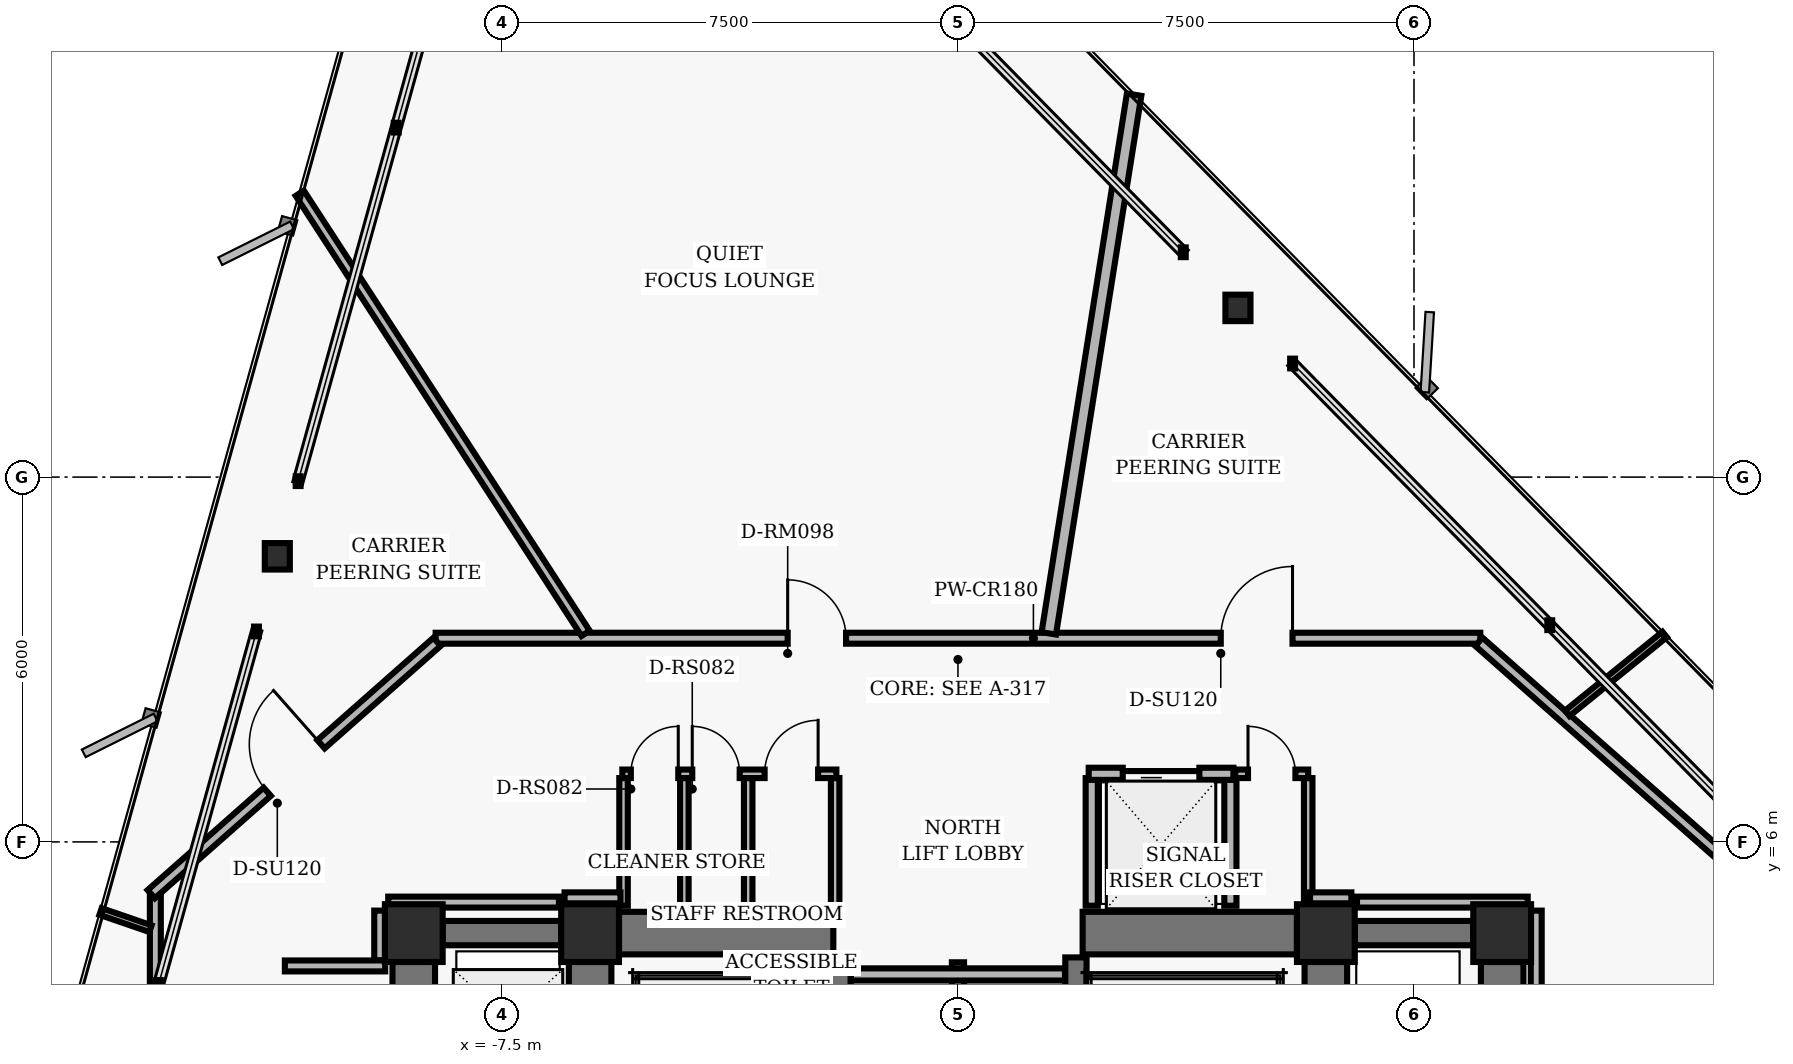
"""IFC4 building model, lengths in metres.
Left out: names, types, materials, properties, quantities, classifications, styles, units other than length and angle.
Written with IfcOpenShell. Run it as: python <this file> out.ifc"""

import sys

from ifc_helpers import new_model, si_unit, direction, frame, frame_2d, origin, origin_2d, place, context, subcontext, project, spatial, rectangle, hollow_rectangle, i_section, extrude, element, fill, save


model = new_model("IFC4")
c1 = context("Model", 3, precision=1e-05, world=origin(), true_north=direction((0.0, 1.0)))
c2 = subcontext(c1, "Body", "Model", "MODEL_VIEW")
j1 = project(units=[si_unit("LENGTHUNIT", "METRE"), si_unit("PLANEANGLEUNIT", "RADIAN")], contexts=[c1])
p1 = place(None, origin())
s1 = spatial("IfcSite", under=j1, at=p1, CompositionType="ELEMENT")
p2 = place(p1, origin())
s2 = spatial("IfcBuilding", under=s1, at=p2, CompositionType="ELEMENT")
p3 = place(p2, frame((0.0, 0.0, 91.68)))
s3 = spatial("IfcBuildingStorey", under=s2, at=p3, CompositionType="ELEMENT", Elevation=91.68)
for number, where, z_axis, x_axis in (
    (1, (-6.05, 4.5, 0.0), (0.0, 0.0, 1.0), (1.0, 0.0, 0.0)),
    (2, (6.05, 4.5, 0.0), (0.0, 0.0, 1.0), (1.0, 0.0, 0.0)),
    (3, (-8.95, 4.5, 0.0), (0.0, 0.0, 1.0), (1.0, 0.0, 0.0)),
    (4, (8.95, 4.5, 0.0), (0.0, 0.0, 1.0), (1.0, 0.0, 0.0)),
):
    element("IfcColumn", number, at=place(p3, frame(where, z_axis=z_axis, x_axis=x_axis)), inside=s3, PredefinedType="COLUMN", context=c2, shape_type="SweptSolid", body=[
        extrude(hollow_rectangle(XDim=0.95, YDim=0.95, WallThickness=0.06, InnerFilletRadius=0.02, OuterFilletRadius=0.04, at=origin_2d()), origin(), (0.0, 0.0, 1.0), 3.04),
    ])
for number, where, z_axis, x_axis in (
    (5, (-6.05, 0.475, 0.0), (0.0, 0.0, 1.0), (0.0, 1.0, 0.0)),
    (6, (6.05, 0.475, 0.0), (0.0, 0.0, 1.0), (0.0, 1.0, 0.0)),
):
    element("IfcWall", number, at=place(p3, frame(where, z_axis=z_axis, x_axis=x_axis)), inside=s3, PredefinedType="SHEAR", context=c2, shape_type="SweptSolid", body=[
        extrude(rectangle(XDim=3.55, YDim=0.7, at=frame_2d((1.775, 0.0))), origin(), (0.0, 0.0, 1.0), 2.788),
    ])
for number, where, z_axis, x_axis in (
    (7, (-1.94, -4.1, 0.0), (0.0, 0.0, 1.0), (0.0, 1.0, 0.0)),
    (8, (1.94, -4.1, 0.0), (0.0, 0.0, 1.0), (0.0, 1.0, 0.0)),
):
    element("IfcWall", number, at=place(p3, frame(where, z_axis=z_axis, x_axis=x_axis)), inside=s3, PredefinedType="SHEAR", context=c2, shape_type="SweptSolid", body=[
        extrude(rectangle(XDim=8.2, YDim=0.35, at=frame_2d((4.1, 0.0))), origin(), (0.0, 0.0, 1.0), 2.788),
    ])
for number, where, z_axis, x_axis in (
    (9, (-5.575, 4.5, 0.0), (0.0, 0.0, 1.0), (1.0, 0.0, 0.0)),
    (10, (2.05, 4.5, 0.0), (0.0, 0.0, 1.0), (1.0, 0.0, 0.0)),
):
    element("IfcWall", number, at=place(p3, frame(where, z_axis=z_axis, x_axis=x_axis)), inside=s3, PredefinedType="SHEAR", context=c2, shape_type="SweptSolid", body=[
        extrude(rectangle(XDim=3.525, YDim=0.7, at=frame_2d((1.762, 0.0))), origin(), (0.0, 0.0, 1.0), 2.788),
    ])
p4 = place(p3, frame((-8.95, -3.825, 0.0), z_axis=(0.0, 0.0, 1.0), x_axis=(0.0, 1.0, 0.0)))
e11 = element("IfcWall", 11, at=p4, inside=s3, PredefinedType="SHEAR", context=c2, shape_type="SweptSolid", body=[
    extrude(rectangle(XDim=7.85, YDim=0.7, at=frame_2d((3.925, 0.0))), origin(), (0.0, 0.0, 1.0), 2.788),
])
p5 = place(p4, frame((0.55, 0.0, 0.0)))
e12 = element("IfcOpeningElement", 12, at=p5, cuts=e11, PredefinedType="OPENING", context=c2, shape_type="SweptSolid", body=[
    extrude(rectangle(XDim=1.06, YDim=2.04, at=frame_2d((0.53, 1.02))), frame((0.0, 0.36, 0.0), z_axis=(0.0, -1.0, 0.0), x_axis=(1.0, 0.0, 0.0)), (0.0, 0.0, 1.0), 0.72),
])
p6 = place(p4, frame((3.395, 0.0, 0.0)))
e13 = element("IfcOpeningElement", 13, at=p6, cuts=e11, PredefinedType="OPENING", context=c2, shape_type="SweptSolid", body=[
    extrude(rectangle(XDim=1.06, YDim=2.04, at=frame_2d((0.53, 1.02))), frame((0.0, 0.36, 0.0), z_axis=(0.0, -1.0, 0.0), x_axis=(1.0, 0.0, 0.0)), (0.0, 0.0, 1.0), 0.72),
])
p7 = place(p4, frame((6.23, 0.0, 0.0)))
e14 = element("IfcOpeningElement", 14, at=p7, cuts=e11, PredefinedType="OPENING", context=c2, shape_type="SweptSolid", body=[
    extrude(rectangle(XDim=1.06, YDim=2.04, at=frame_2d((0.53, 1.02))), frame((0.0, 0.36, 0.0), z_axis=(0.0, -1.0, 0.0), x_axis=(1.0, 0.0, 0.0)), (0.0, 0.0, 1.0), 0.72),
])
p8 = place(p3, frame((-8.475, 4.5, 0.0), z_axis=(0.0, 0.0, 1.0), x_axis=(1.0, 0.0, 0.0)))
e15 = element("IfcWall", 15, at=p8, inside=s3, PredefinedType="SHEAR", context=c2, shape_type="SweptSolid", body=[
    extrude(rectangle(XDim=1.95, YDim=0.4, at=frame_2d((0.975, 0.0))), origin(), (0.0, 0.0, 1.0), 2.788),
])
p9 = place(p3, frame((8.95, -3.825, 0.0), z_axis=(0.0, 0.0, 1.0), x_axis=(0.0, 1.0, 0.0)))
e16 = element("IfcWall", 16, at=p9, inside=s3, PredefinedType="SHEAR", context=c2, shape_type="SweptSolid", body=[
    extrude(rectangle(XDim=7.85, YDim=0.7, at=frame_2d((3.925, 0.0))), origin(), (0.0, 0.0, 1.0), 2.788),
])
p10 = place(p3, frame((6.525, 4.5, 0.0), z_axis=(0.0, 0.0, 1.0), x_axis=(1.0, 0.0, 0.0)))
e17 = element("IfcWall", 17, at=p10, inside=s3, PredefinedType="SHEAR", context=c2, shape_type="SweptSolid", body=[
    extrude(rectangle(XDim=1.95, YDim=0.4, at=frame_2d((0.975, 0.0))), origin(), (0.0, 0.0, 1.0), 2.788),
])
for number, where, z_axis, x_axis in (
    (18, (4.604, 14.783, 0.0), (0.0, 0.0, 1.0), (1.0, 0.0, 0.0)),
    (19, (-11.194, 10.697, 0.0), (0.0, 0.0, 1.0), (1.0, 0.0, 0.0)),
):
    element("IfcColumn", number, at=place(p3, frame(where, z_axis=z_axis, x_axis=x_axis)), inside=s3, PredefinedType="COLUMN", context=c2, shape_type="SweptSolid", body=[
        extrude(i_section(OverallWidth=0.412, OverallDepth=0.435, WebThickness=0.036, FlangeThickness=0.057, FilletRadius=0.022, at=origin_2d()), origin(), (0.0, 0.0, 1.0), 3.04),
    ])
p11 = place(p3, frame((0.0, 1.25, 0.0), z_axis=(0.0, 0.0, 1.0), x_axis=(0.0, 1.0, 0.0)))
e20 = element("IfcWall", 20, at=p11, inside=s3, PredefinedType="PARTITIONING", context=c2, shape_type="SweptSolid", body=[
    extrude(rectangle(XDim=2.77, YDim=0.2, at=frame_2d((1.385, 0.0))), origin(), (0.0, 0.0, 1.0), 2.763),
])
p12 = place(p3, frame((-1.76, 3.82, 0.0), z_axis=(0.0, 0.0, 1.0), x_axis=(1.0, 0.0, 0.0)))
e21 = element("IfcWall", 21, at=p12, inside=s3, PredefinedType="PARTITIONING", context=c2, shape_type="SweptSolid", body=[
    extrude(rectangle(XDim=3.52, YDim=0.2, at=frame_2d((1.76, 0.0))), origin(), (0.0, 0.0, 1.0), 2.763),
])
for number, where, z_axis, x_axis in (
    (22, (2.2, 4.95, 0.0), (0.0, 0.0, 1.0), (0.0, 1.0, 0.0)),
    (23, (4.48, 4.95, 0.0), (0.0, 0.0, 1.0), (0.0, 1.0, 0.0)),
):
    element("IfcWall", number, at=place(p3, frame(where, z_axis=z_axis, x_axis=x_axis)), inside=s3, PredefinedType="PARTITIONING", context=c2, shape_type="SweptSolid", body=[
        extrude(rectangle(XDim=2.1, YDim=0.2, at=frame_2d((1.05, 0.0))), origin(), (0.0, 0.0, 1.0), 2.763),
    ])
p13 = place(p3, frame((2.15, 7.12, 0.0), z_axis=(0.0, 0.0, 1.0), x_axis=(1.0, 0.0, 0.0)))
e24 = element("IfcWall", 24, at=p13, inside=s3, PredefinedType="PARTITIONING", context=c2, shape_type="SweptSolid", body=[
    extrude(rectangle(XDim=2.38, YDim=0.2, at=frame_2d((1.19, 0.0))), origin(), (0.0, 0.0, 1.0), 2.763),
])
p14 = place(p13, frame((0.56, 0.0, 0.0)))
e25 = element("IfcOpeningElement", 25, at=p14, cuts=e24, PredefinedType="OPENING", context=c2, shape_type="SweptSolid", body=[
    extrude(rectangle(XDim=1.26, YDim=2.06, at=frame_2d((0.63, 1.03))), frame((0.0, 0.11, 0.0), z_axis=(0.0, -1.0, 0.0), x_axis=(1.0, 0.0, 0.0)), (0.0, 0.0, 1.0), 0.22),
])
for number, where, z_axis, x_axis in (
    (26, (-5.5, 4.95, 0.0), (0.0, 0.0, 1.0), (0.0, 1.0, 0.0)),
    (27, (-4.5, 4.95, 0.0), (0.0, 0.0, 1.0), (0.0, 1.0, 0.0)),
    (28, (-3.45, 4.95, 0.0), (0.0, 0.0, 1.0), (0.0, 1.0, 0.0)),
    (29, (-2.02, 4.95, 0.0), (0.0, 0.0, 1.0), (0.0, 1.0, 0.0)),
):
    element("IfcWall", number, at=place(p3, frame(where, z_axis=z_axis, x_axis=x_axis)), inside=s3, PredefinedType="PARTITIONING", context=c2, shape_type="SweptSolid", body=[
        extrude(rectangle(XDim=2.1, YDim=0.14, at=frame_2d((1.05, 0.0))), origin(), (0.0, 0.0, 1.0), 2.763),
    ])
p15 = place(p3, frame((-5.52, 7.12, 0.0), z_axis=(0.0, 0.0, 1.0), x_axis=(1.0, 0.0, 0.0)))
e30 = element("IfcWall", 30, at=p15, inside=s3, PredefinedType="PARTITIONING", context=c2, shape_type="SweptSolid", body=[
    extrude(rectangle(XDim=3.52, YDim=0.14, at=frame_2d((1.76, 0.0))), origin(), (0.0, 0.0, 1.0), 2.763),
])
p16 = place(p15, frame((0.14, 0.0, 0.0)))
e31 = element("IfcOpeningElement", 31, at=p16, cuts=e30, PredefinedType="OPENING", context=c2, shape_type="SweptSolid", body=[
    extrude(rectangle(XDim=0.78, YDim=2.01, at=frame_2d((0.39, 1.005))), frame((0.0, 0.08, 0.0), z_axis=(0.0, -1.0, 0.0), x_axis=(1.0, 0.0, 0.0)), (0.0, 0.0, 1.0), 0.16),
])
p17 = place(p15, frame((1.15, 0.0, 0.0)))
e32 = element("IfcOpeningElement", 32, at=p17, cuts=e30, PredefinedType="OPENING", context=c2, shape_type="SweptSolid", body=[
    extrude(rectangle(XDim=0.78, YDim=2.01, at=frame_2d((0.39, 1.005))), frame((0.0, 0.08, 0.0), z_axis=(0.0, -1.0, 0.0), x_axis=(1.0, 0.0, 0.0)), (0.0, 0.0, 1.0), 0.16),
])
p18 = place(p15, frame((2.34, 0.0, 0.0)))
e33 = element("IfcOpeningElement", 33, at=p18, cuts=e30, PredefinedType="OPENING", context=c2, shape_type="SweptSolid", body=[
    extrude(rectangle(XDim=0.88, YDim=2.02, at=frame_2d((0.44, 1.01))), frame((0.0, 0.08, 0.0), z_axis=(0.0, -1.0, 0.0), x_axis=(1.0, 0.0, 0.0)), (0.0, 0.0, 1.0), 0.16),
])
p19 = place(p3, frame((5.76, 4.95, 0.0), z_axis=(0.0, 0.0, 1.0), x_axis=(0.0, 1.0, 0.0)))
e34 = element("IfcWall", 34, at=p19, inside=s3, PredefinedType="PARTITIONING", context=c2, shape_type="SweptSolid", body=[
    extrude(rectangle(XDim=2.1, YDim=0.14, at=frame_2d((1.05, 0.0))), origin(), (0.0, 0.0, 1.0), 2.763),
])
p20 = place(p3, frame((4.56, 7.12, 0.0), z_axis=(0.0, 0.0, 1.0), x_axis=(1.0, 0.0, 0.0)))
e35 = element("IfcWall", 35, at=p20, inside=s3, PredefinedType="PARTITIONING", context=c2, shape_type="SweptSolid", body=[
    extrude(rectangle(XDim=1.2, YDim=0.14, at=frame_2d((0.6, 0.0))), origin(), (0.0, 0.0, 1.0), 2.763),
])
p21 = place(p20, frame((0.21, 0.0, 0.0)))
e36 = element("IfcOpeningElement", 36, at=p21, cuts=e35, PredefinedType="OPENING", context=c2, shape_type="SweptSolid", body=[
    extrude(rectangle(XDim=0.78, YDim=2.01, at=frame_2d((0.39, 1.005))), frame((0.0, 0.08, 0.0), z_axis=(0.0, -1.0, 0.0), x_axis=(1.0, 0.0, 0.0)), (0.0, 0.0, 1.0), 0.16),
])
p22 = place(p3, frame((-8.59, 9.35, 0.0), z_axis=(0.0, 0.0, 1.0), x_axis=(1.0, 0.0, 0.0)))
e37 = element("IfcWall", 37, at=p22, inside=s3, PredefinedType="PARTITIONING", context=c2, shape_type="SweptSolid", body=[
    extrude(rectangle(XDim=17.18, YDim=0.18, at=frame_2d((8.59, 0.0))), origin(), (0.0, 0.0, 1.0), 2.277),
])
p23 = place(p22, frame((12.912, 0.0, 0.0)))
e38 = element("IfcOpeningElement", 38, at=p23, cuts=e37, PredefinedType="OPENING", context=c2, shape_type="SweptSolid", body=[
    extrude(rectangle(XDim=1.18, YDim=2.02, at=frame_2d((0.59, 1.01))), frame((0.0, 0.1, 0.0), z_axis=(0.0, -1.0, 0.0), x_axis=(1.0, 0.0, 0.0)), (0.0, 0.0, 1.0), 0.2),
])
p24 = place(p22, frame((5.79, 0.0, 0.0)))
e39 = element("IfcOpeningElement", 39, at=p24, cuts=e37, PredefinedType="OPENING", context=c2, shape_type="SweptSolid", body=[
    extrude(rectangle(XDim=0.96, YDim=2.02, at=frame_2d((0.48, 1.01))), frame((0.0, 0.1, 0.0), z_axis=(0.0, -1.0, 0.0), x_axis=(1.0, 0.0, 0.0)), (0.0, 0.0, 1.0), 0.2),
])
p25 = place(p3, frame((8.567, 9.29, 0.0), z_axis=(0.0, 0.0, 1.0), x_axis=(0.749626463267, -0.66186113768, 0.0)))
e40 = element("IfcWall", 40, at=p25, inside=s3, PredefinedType="PARTITIONING", context=c2, shape_type="SweptSolid", body=[
    extrude(rectangle(XDim=6.27, YDim=0.18, at=frame_2d((3.135, 0.0))), origin(), (0.0, 0.0, 1.0), 2.277),
])
p26 = place(p3, frame((-13.2, -5.11, 0.0), z_axis=(0.0, 0.0, 1.0), x_axis=(0.0, 1.0, 0.0)))
e41 = element("IfcWall", 41, at=p26, inside=s3, PredefinedType="PARTITIONING", context=c2, shape_type="SweptSolid", body=[
    extrude(rectangle(XDim=10.22, YDim=0.18, at=frame_2d((5.11, 0.0))), origin(), (0.0, 0.0, 1.0), 2.143),
])
p27 = place(p26, frame((1.676, 0.0, 0.0)))
e42 = element("IfcOpeningElement", 42, at=p27, cuts=e41, PredefinedType="OPENING", context=c2, shape_type="SweptSolid", body=[
    extrude(rectangle(XDim=1.18, YDim=2.02, at=frame_2d((0.59, 1.01))), frame((0.0, 0.1, 0.0), z_axis=(0.0, -1.0, 0.0), x_axis=(1.0, 0.0, 0.0)), (0.0, 0.0, 1.0), 0.2),
])
p28 = place(p26, frame((5.99, 0.0, 0.0)))
e43 = element("IfcOpeningElement", 43, at=p28, cuts=e41, PredefinedType="OPENING", context=c2, shape_type="SweptSolid", body=[
    extrude(rectangle(XDim=1.18, YDim=2.02, at=frame_2d((0.59, 1.01))), frame((0.0, 0.1, 0.0), z_axis=(0.0, -1.0, 0.0), x_axis=(1.0, 0.0, 0.0)), (0.0, 0.0, 1.0), 0.2),
])
p29 = place(p3, frame((-13.268, 5.14, 0.0), z_axis=(0.0, 0.0, 1.0), x_axis=(0.749626463267, 0.66186113768, 0.0)))
e44 = element("IfcWall", 44, at=p29, inside=s3, PredefinedType="PARTITIONING", context=c2, shape_type="SweptSolid", body=[
    extrude(rectangle(XDim=6.27, YDim=0.18, at=frame_2d((3.135, 0.0))), origin(), (0.0, 0.0, 1.0), 2.763),
])
p30 = place(p29, frame((2.545, 0.0, 0.0)))
e45 = element("IfcOpeningElement", 45, at=p30, cuts=e44, PredefinedType="OPENING", context=c2, shape_type="SweptSolid", body=[
    extrude(rectangle(XDim=1.18, YDim=2.02, at=frame_2d((0.59, 1.01))), frame((0.0, 0.1, 0.0), z_axis=(0.0, -1.0, 0.0), x_axis=(1.0, 0.0, 0.0)), (0.0, 0.0, 1.0), 0.2),
])
p31 = place(p3, frame((-9.51, 4.87, 0.0), z_axis=(0.0, 0.0, 1.0), x_axis=(0.0, -1.0, 0.0)))
e46 = element("IfcWall", 46, at=p31, inside=s3, PredefinedType="PARTITIONING", context=c2, shape_type="SweptSolid", body=[
    extrude(rectangle(XDim=0.82, YDim=0.18, at=frame_2d((0.41, 0.0))), origin(), (0.0, 0.0, 1.0), 2.277),
])
p32 = place(p3, frame((-9.42, 3.96, 0.0), z_axis=(0.0, 0.0, 1.0), x_axis=(-1.0, 0.0, 0.0)))
e47 = element("IfcWall", 47, at=p32, inside=s3, PredefinedType="PARTITIONING", context=c2, shape_type="SweptSolid", body=[
    extrude(rectangle(XDim=1.65, YDim=0.18, at=frame_2d((0.825, 0.0))), origin(), (0.0, 0.0, 1.0), 2.763),
])
p33 = place(p3, frame((9.51, -4.87, 0.0), z_axis=(0.0, 0.0, 1.0), x_axis=(0.0, 1.0, 0.0)))
e48 = element("IfcWall", 48, at=p33, inside=s3, PredefinedType="PARTITIONING", context=c2, shape_type="SweptSolid", body=[
    extrude(rectangle(XDim=9.74, YDim=0.18, at=frame_2d((4.87, 0.0))), origin(), (0.0, 0.0, 1.0), 2.048),
])
p34 = place(p3, frame((9.37, 5.01, 0.0), z_axis=(0.0, 0.0, 1.0), x_axis=(-1.0, 0.0, 0.0)))
e49 = element("IfcWall", 49, at=p34, inside=s3, PredefinedType="PARTITIONING", context=c2, shape_type="SweptSolid", body=[
    extrude(rectangle(XDim=2.808, YDim=0.18, at=frame_2d((1.404, 0.0))), origin(), (0.0, 0.0, 1.0), 2.763),
])
p35 = place(p3, frame((6.47, 5.08, 0.0), z_axis=(0.0, 0.0, 1.0), x_axis=(-1.0, 0.0, 0.0)))
e50 = element("IfcWall", 50, at=p35, inside=s3, PredefinedType="PARTITIONING", context=c2, shape_type="SweptSolid", body=[
    extrude(rectangle(XDim=0.68, YDim=0.18, at=frame_2d((0.34, 0.0))), origin(), (0.0, 0.0, 1.0), 2.763),
])
p36 = place(p3, frame((-5.55, 5.08, 0.0), z_axis=(0.0, 0.0, 1.0), x_axis=(-1.0, 0.0, 0.0)))
e51 = element("IfcWall", 51, at=p36, inside=s3, PredefinedType="PARTITIONING", context=c2, shape_type="SweptSolid", body=[
    extrude(rectangle(XDim=0.92, YDim=0.18, at=frame_2d((0.46, 0.0))), origin(), (0.0, 0.0, 1.0), 2.763),
])
p37 = place(p3, frame((-6.562, 5.01, 0.0), z_axis=(0.0, 0.0, 1.0), x_axis=(-1.0, 0.0, 0.0)))
e52 = element("IfcWall", 52, at=p37, inside=s3, PredefinedType="PARTITIONING", context=c2, shape_type="SweptSolid", body=[
    extrude(rectangle(XDim=2.808, YDim=0.18, at=frame_2d((1.404, 0.0))), origin(), (0.0, 0.0, 1.0), 2.763),
])
p38 = place(p3, frame((10.02, 8.114, 0.0), z_axis=(0.0, 0.0, 1.0), x_axis=(0.777156579316, 0.62930727886, 0.0)))
e53 = element("IfcWall", 53, at=p38, inside=s3, PredefinedType="MOVABLE", context=c2, shape_type="SweptSolid", body=[
    extrude(rectangle(XDim=2.061, YDim=0.115, at=frame_2d((1.03, 0.0))), origin(), (0.0, 0.0, 1.0), 2.763),
])
p39 = place(p3, frame((1.494, 9.43, 0.0), z_axis=(0.0, 0.0, 1.0), x_axis=(0.156413985488, 0.98769158402, 0.0)))
e54 = element("IfcWall", 54, at=p39, inside=s3, PredefinedType="PARTITIONING", context=c2, shape_type="SweptSolid", body=[
    extrude(rectangle(XDim=8.97, YDim=0.24, at=frame_2d((4.485, 0.0))), origin(), (0.0, 0.0, 1.0), 2.763),
])
p40 = place(p3, frame((-6.124, 9.43, 0.0), z_axis=(0.0, 0.0, 1.0), x_axis=(-0.544640325453, 0.838669729924, 0.0)))
e55 = element("IfcWall", 55, at=p40, inside=s3, PredefinedType="PARTITIONING", context=c2, shape_type="SweptSolid", body=[
    extrude(rectangle(XDim=8.631, YDim=0.16, at=frame_2d((4.316, 0.0))), origin(), (0.0, 0.0, 1.0), 2.763),
])
p41 = place(p3, frame((-13.28, 4.573, 0.0), z_axis=(0.0, 0.0, 1.0), x_axis=(-0.945516304874, 0.325574749047, 0.0)))
e56 = element("IfcWall", 56, at=p41, inside=s3, PredefinedType="MOVABLE", context=c2, shape_type="SweptSolid", body=[
    extrude(rectangle(XDim=0.868, YDim=0.115, at=frame_2d((0.434, 0.0))), origin(), (0.0, 0.0, 1.0), 2.763),
])
p42 = place(p14, origin())
e57 = element("IfcDoor", 57, at=p42, inside=s3, OperationType="SLIDING_TO_LEFT", PredefinedType="DOOR", context=c2, shape_type="SweptSolid", body=[
    extrude(rectangle(XDim=1.26, YDim=2.06, at=frame_2d((0.63, 1.03))), frame((0.0, 0.025, 0.0), z_axis=(0.0, -1.0, 0.0), x_axis=(1.0, 0.0, 0.0)), (0.0, 0.0, 1.0), 0.05),
])
fill(e25, e57)
p43 = place(p16, origin())
e58 = element("IfcDoor", 58, at=p43, inside=s3, OperationType="SINGLE_SWING_RIGHT", PredefinedType="DOOR", context=c2, shape_type="SweptSolid", body=[
    extrude(rectangle(XDim=0.78, YDim=2.01, at=frame_2d((0.39, 1.005))), frame((0.0, 0.025, 0.0), z_axis=(0.0, -1.0, 0.0), x_axis=(1.0, 0.0, 0.0)), (0.0, 0.0, 1.0), 0.05),
])
fill(e31, e58)
p44 = place(p17, origin())
e59 = element("IfcDoor", 59, at=p44, inside=s3, OperationType="SINGLE_SWING_LEFT", PredefinedType="DOOR", context=c2, shape_type="SweptSolid", body=[
    extrude(rectangle(XDim=0.78, YDim=2.01, at=frame_2d((0.39, 1.005))), frame((0.0, 0.025, 0.0), z_axis=(0.0, -1.0, 0.0), x_axis=(1.0, 0.0, 0.0)), (0.0, 0.0, 1.0), 0.05),
])
fill(e32, e59)
p45 = place(p18, origin())
e60 = element("IfcDoor", 60, at=p45, inside=s3, OperationType="SINGLE_SWING_RIGHT", PredefinedType="DOOR", context=c2, shape_type="SweptSolid", body=[
    extrude(rectangle(XDim=0.88, YDim=2.02, at=frame_2d((0.44, 1.01))), frame((0.0, 0.025, 0.0), z_axis=(0.0, -1.0, 0.0), x_axis=(1.0, 0.0, 0.0)), (0.0, 0.0, 1.0), 0.05),
])
fill(e33, e60)
p46 = place(p21, origin())
e61 = element("IfcDoor", 61, at=p46, inside=s3, OperationType="SINGLE_SWING_LEFT", PredefinedType="DOOR", context=c2, shape_type="SweptSolid", body=[
    extrude(rectangle(XDim=0.78, YDim=2.01, at=frame_2d((0.39, 1.005))), frame((0.0, 0.025, 0.0), z_axis=(0.0, -1.0, 0.0), x_axis=(1.0, 0.0, 0.0)), (0.0, 0.0, 1.0), 0.05),
])
fill(e36, e61)
p47 = place(p23, origin())
e62 = element("IfcDoor", 62, at=p47, inside=s3, OperationType="SINGLE_SWING_RIGHT", PredefinedType="DOOR", context=c2, shape_type="SweptSolid", body=[
    extrude(rectangle(XDim=1.18, YDim=2.02, at=frame_2d((0.59, 1.01))), frame((0.0, 0.025, 0.0), z_axis=(0.0, -1.0, 0.0), x_axis=(1.0, 0.0, 0.0)), (0.0, 0.0, 1.0), 0.05),
])
fill(e38, e62)
p48 = place(p24, origin())
e63 = element("IfcDoor", 63, at=p48, inside=s3, OperationType="SINGLE_SWING_LEFT", PredefinedType="DOOR", context=c2, shape_type="SweptSolid", body=[
    extrude(rectangle(XDim=0.96, YDim=2.02, at=frame_2d((0.48, 1.01))), frame((0.0, 0.025, 0.0), z_axis=(0.0, -1.0, 0.0), x_axis=(1.0, 0.0, 0.0)), (0.0, 0.0, 1.0), 0.05),
])
fill(e39, e63)
p49 = place(p30, origin())
e64 = element("IfcDoor", 64, at=p49, inside=s3, OperationType="SINGLE_SWING_RIGHT", PredefinedType="DOOR", context=c2, shape_type="SweptSolid", body=[
    extrude(rectangle(XDim=1.18, YDim=2.02, at=frame_2d((0.59, 1.01))), frame((0.0, 0.025, 0.0), z_axis=(0.0, -1.0, 0.0), x_axis=(1.0, 0.0, 0.0)), (0.0, 0.0, 1.0), 0.05),
])
fill(e45, e64)
save(model, sys.argv[1])
